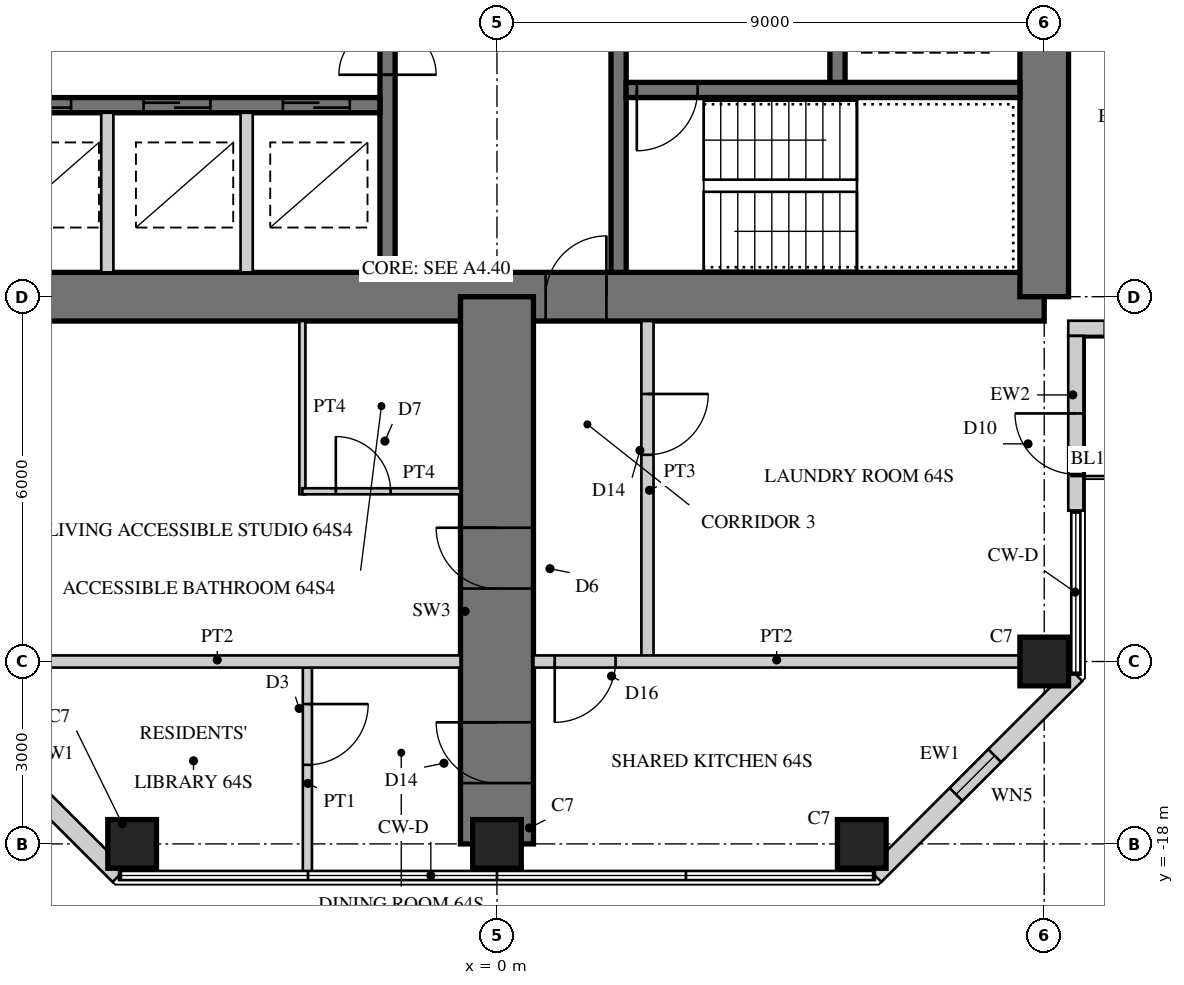
"""IFC4 building model, lengths in metres.
Left out: names, types, materials, properties, quantities, classifications, styles, units other than length and angle.
Written with IfcOpenShell. Run it as: python <this file> out.ifc"""

import sys

from ifc_helpers import new_model, si_unit, direction, frame, frame_2d, origin, origin_2d, place, context, subcontext, project, spatial, rectangle, hollow_rectangle, extrude, element, fill, save


model = new_model("IFC4")
c1 = context("Model", 3, precision=1e-05, world=origin(), true_north=direction((0.0, 1.0)))
c2 = subcontext(c1, "Body", "Model", "MODEL_VIEW")
j1 = project(units=[si_unit("LENGTHUNIT", "METRE"), si_unit("PLANEANGLEUNIT", "RADIAN")], contexts=[c1])
p1 = place(None, origin())
s1 = spatial("IfcSite", under=j1, at=p1, CompositionType="ELEMENT")
p2 = place(p1, origin())
s2 = spatial("IfcBuilding", under=s1, at=p2, CompositionType="ELEMENT")
p3 = place(p2, frame((0.0, 0.0, 249.3)))
s3 = spatial("IfcBuildingStorey", under=s2, at=p3, CompositionType="ELEMENT", Elevation=249.3)
p4 = place(p3, frame((-9.0, -9.0, 0.0), z_axis=(0.0, 0.0, 1.0), x_axis=(1.0, 0.0, 0.0)))
e1 = element("IfcWall", 1, at=p4, inside=s3, PredefinedType="SHEAR", context=c2, shape_type="SweptSolid", body=[
    extrude(rectangle(XDim=18.0, YDim=0.8, at=frame_2d((9.0, 0.0))), origin(), (0.0, 0.0, 1.0), 3.4),
])
p5 = place(p4, frame((9.8, 0.0, 0.0)))
e2 = element("IfcOpeningElement", 2, at=p5, cuts=e1, PredefinedType="OPENING", context=c2, shape_type="SweptSolid", body=[
    extrude(rectangle(XDim=1.0, YDim=2.4, at=frame_2d((0.5, 1.2))), frame((0.0, 0.41, 0.0), z_axis=(0.0, -1.0, 0.0), x_axis=(1.0, 0.0, 0.0)), (0.0, 0.0, 1.0), 0.82),
])
p6 = place(p3, frame((9.0, -9.0, 0.0), z_axis=(0.0, 0.0, 1.0), x_axis=(0.0, 1.0, 0.0)))
e3 = element("IfcWall", 3, at=p6, inside=s3, PredefinedType="SHEAR", context=c2, shape_type="SweptSolid", body=[
    extrude(rectangle(XDim=18.0, YDim=0.8, at=frame_2d((9.0, 0.0))), origin(), (0.0, 0.0, 1.0), 3.4),
])
p7 = place(p6, frame((9.8, 0.0, 0.0)))
e4 = element("IfcOpeningElement", 4, at=p7, cuts=e3, PredefinedType="OPENING", context=c2, shape_type="SweptSolid", body=[
    extrude(rectangle(XDim=1.0, YDim=2.4, at=frame_2d((0.5, 1.2))), frame((0.0, 0.41, 0.0), z_axis=(0.0, -1.0, 0.0), x_axis=(1.0, 0.0, 0.0)), (0.0, 0.0, 1.0), 0.82),
])
p8 = place(p3, frame((-1.8, -1.875, 0.0), z_axis=(0.0, 0.0, 1.0), x_axis=(0.0, -1.0, 0.0)))
e5 = element("IfcWall", 5, at=p8, inside=s3, PredefinedType="SHEAR", context=c2, shape_type="SweptSolid", body=[
    extrude(rectangle(XDim=6.725, YDim=0.25, at=frame_2d((3.363, 0.0))), origin(), (0.0, 0.0, 1.0), 3.4),
])
p9 = place(p8, frame((1.875, 0.0, 0.0)))
e6 = element("IfcOpeningElement", 6, at=p9, cuts=e5, PredefinedType="OPENING", context=c2, shape_type="SweptSolid", body=[
    extrude(rectangle(XDim=1.6, YDim=2.4, at=frame_2d((0.8, 1.2))), frame((0.0, 0.135, 0.0), z_axis=(0.0, -1.0, 0.0), x_axis=(1.0, 0.0, 0.0)), (0.0, 0.0, 1.0), 0.27),
])
p10 = place(p3, frame((-1.925, -5.85, 0.0), z_axis=(0.0, 0.0, 1.0), x_axis=(-1.0, 0.0, 0.0)))
e7 = element("IfcWall", 7, at=p10, inside=s3, PredefinedType="SHEAR", context=c2, shape_type="SweptSolid", body=[
    extrude(rectangle(XDim=6.675, YDim=0.25, at=frame_2d((3.337, 0.0))), origin(), (0.0, 0.0, 1.0), 3.4),
])
p11 = place(p10, frame((0.496, 0.0, 0.0)))
e8 = element("IfcOpeningElement", 8, at=p11, cuts=e7, PredefinedType="OPENING", context=c2, shape_type="SweptSolid", body=[
    extrude(rectangle(XDim=1.1, YDim=2.2, at=frame_2d((0.55, 1.1))), frame((0.0, 0.135, 0.0), z_axis=(0.0, -1.0, 0.0), x_axis=(1.0, 0.0, 0.0)), (0.0, 0.0, 1.0), 0.27),
])
p12 = place(p10, frame((2.788, 0.0, 0.0)))
e9 = element("IfcOpeningElement", 9, at=p12, cuts=e7, PredefinedType="OPENING", context=c2, shape_type="SweptSolid", body=[
    extrude(rectangle(XDim=1.1, YDim=2.2, at=frame_2d((0.55, 1.1))), frame((0.0, 0.135, 0.0), z_axis=(0.0, -1.0, 0.0), x_axis=(1.0, 0.0, 0.0)), (0.0, 0.0, 1.0), 0.27),
])
p13 = place(p10, frame((5.079, 0.0, 0.0)))
e10 = element("IfcOpeningElement", 10, at=p13, cuts=e7, PredefinedType="OPENING", context=c2, shape_type="SweptSolid", body=[
    extrude(rectangle(XDim=1.1, YDim=2.2, at=frame_2d((0.55, 1.1))), frame((0.0, 0.135, 0.0), z_axis=(0.0, -1.0, 0.0), x_axis=(1.0, 0.0, 0.0)), (0.0, 0.0, 1.0), 0.27),
])
for number, where, z_axis, x_axis in (
    (11, (-4.117, -5.975, 0.0), (0.0, 0.0, 1.0), (0.0, -1.0, 0.0)),
    (12, (-6.408, -5.975, 0.0), (0.0, 0.0, 1.0), (0.0, -1.0, 0.0)),
):
    element("IfcWall", number, at=place(p3, frame(where, z_axis=z_axis, x_axis=x_axis)), inside=s3, PredefinedType="PARTITIONING", context=c2, shape_type="SweptSolid", body=[
        extrude(rectangle(XDim=2.625, YDim=0.2, at=frame_2d((1.312, 0.0))), origin(), (0.0, 0.0, 1.0), 3.4),
    ])
p14 = place(p3, frame((2.0, -1.675, 0.0), z_axis=(0.0, 0.0, 1.0), x_axis=(0.0, -1.0, 0.0)))
e13 = element("IfcWall", 13, at=p14, inside=s3, PredefinedType="SHEAR", context=c2, shape_type="SweptSolid", body=[
    extrude(rectangle(XDim=6.925, YDim=0.25, at=frame_2d((3.462, 0.0))), origin(), (0.0, 0.0, 1.0), 3.4),
])
p15 = place(p14, frame((0.725, 0.0, 0.0)))
e14 = element("IfcOpeningElement", 14, at=p15, cuts=e13, PredefinedType="OPENING", context=c2, shape_type="SweptSolid", body=[
    extrude(rectangle(XDim=1.0, YDim=2.1, at=frame_2d((0.5, 1.05))), frame((0.0, 0.135, 0.0), z_axis=(0.0, -1.0, 0.0), x_axis=(1.0, 0.0, 0.0)), (0.0, 0.0, 1.0), 0.27),
])
p16 = place(p3, frame((2.125, -5.6, 0.0), z_axis=(0.0, 0.0, 1.0), x_axis=(1.0, 0.0, 0.0)))
e15 = element("IfcWall", 15, at=p16, inside=s3, PredefinedType="SHEAR", context=c2, shape_type="SweptSolid", body=[
    extrude(rectangle(XDim=6.475, YDim=0.25, at=frame_2d((3.238, 0.0))), origin(), (0.0, 0.0, 1.0), 3.4),
])
p17 = place(p16, frame((0.175, 0.0, 0.0)))
e16 = element("IfcOpeningElement", 16, at=p17, cuts=e15, PredefinedType="OPENING", context=c2, shape_type="SweptSolid", body=[
    extrude(rectangle(XDim=1.0, YDim=2.1, at=frame_2d((0.5, 1.05))), frame((0.0, 0.135, 0.0), z_axis=(0.0, -1.0, 0.0), x_axis=(1.0, 0.0, 0.0)), (0.0, 0.0, 1.0), 0.27),
])
p18 = place(p3, frame((5.6, -1.925, 0.0), z_axis=(0.0, 0.0, 1.0), x_axis=(0.0, -1.0, 0.0)))
e17 = element("IfcWall", 17, at=p18, inside=s3, PredefinedType="SHEAR", context=c2, shape_type="SweptSolid", body=[
    extrude(rectangle(XDim=3.55, YDim=0.25, at=frame_2d((1.775, 0.0))), origin(), (0.0, 0.0, 1.0), 3.4),
])
p19 = place(p18, frame((1.525, 0.0, 0.0)))
e18 = element("IfcOpeningElement", 18, at=p19, cuts=e17, PredefinedType="OPENING", context=c2, shape_type="SweptSolid", body=[
    extrude(rectangle(XDim=1.1, YDim=2.2, at=frame_2d((0.55, 1.1))), frame((0.0, 0.135, 0.0), z_axis=(0.0, -1.0, 0.0), x_axis=(1.0, 0.0, 0.0)), (0.0, 0.0, 1.0), 0.27),
])
p20 = place(p18, frame((0.075, 0.0, 0.0)))
e19 = element("IfcOpeningElement", 19, at=p20, cuts=e17, PredefinedType="OPENING", context=c2, shape_type="SweptSolid", body=[
    extrude(rectangle(XDim=0.8, YDim=2.1, at=frame_2d((0.4, 1.05))), frame((0.0, 0.135, 0.0), z_axis=(0.0, -1.0, 0.0), x_axis=(1.0, 0.0, 0.0)), (0.0, 0.0, 1.0), 0.27),
])
p21 = place(p3, frame((0.0, -9.0, 0.0), z_axis=(0.0, 0.0, 1.0), x_axis=(0.0, -1.0, 0.0)))
e20 = element("IfcWall", 20, at=p21, inside=s3, PredefinedType="SHEAR", context=c2, shape_type="SweptSolid", body=[
    extrude(rectangle(XDim=9.0, YDim=1.2, at=frame_2d((4.5, 0.0))), origin(), (0.0, 0.0, 1.0), 3.4),
])
p22 = place(p21, frame((3.8, 0.0, 0.0)))
e21 = element("IfcOpeningElement", 21, at=p22, cuts=e20, PredefinedType="OPENING", context=c2, shape_type="SweptSolid", body=[
    extrude(rectangle(XDim=1.0, YDim=2.15, at=frame_2d((0.5, 1.075))), frame((0.0, 0.61, 0.0), z_axis=(0.0, -1.0, 0.0), x_axis=(1.0, 0.0, 0.0)), (0.0, 0.0, 1.0), 1.22),
])
p23 = place(p21, frame((7.0, 0.0, 0.0)))
e22 = element("IfcOpeningElement", 22, at=p23, cuts=e20, PredefinedType="OPENING", context=c2, shape_type="SweptSolid", body=[
    extrude(rectangle(XDim=1.0, YDim=2.2, at=frame_2d((0.5, 1.1))), frame((0.0, 0.61, 0.0), z_axis=(0.0, -1.0, 0.0), x_axis=(1.0, 0.0, 0.0)), (0.0, 0.0, 1.0), 1.22),
])
for number, where, z_axis, x_axis in (
    (23, (9.0, -15.0, 0.0), (0.0, 0.0, 1.0), (1.0, 0.0, 0.0)),
    (24, (-6.0, -18.0, 0.0), (0.0, 0.0, 1.0), (1.0, 0.0, 0.0)),
    (25, (0.0, -18.0, 0.0), (0.0, 0.0, 1.0), (1.0, 0.0, 0.0)),
    (26, (6.0, -18.0, 0.0), (0.0, 0.0, 1.0), (1.0, 0.0, 0.0)),
):
    element("IfcColumn", number, at=place(p3, frame(where, z_axis=z_axis, x_axis=x_axis)), inside=s3, PredefinedType="COLUMN", context=c2, shape_type="SweptSolid", body=[
        extrude(rectangle(XDim=0.8, YDim=0.8, at=origin_2d()), origin(), (0.0, 0.0, 1.0), 3.4),
    ])
p24 = place(p3, frame((9.395, -9.52, 0.0), z_axis=(0.0, 0.0, 1.0), x_axis=(1.0, 0.0, 0.0)))
e27 = element("IfcWall", 27, at=p24, inside=s3, PredefinedType="SOLIDWALL", context=c2, shape_type="SweptSolid", body=[
    extrude(rectangle(XDim=3.125, YDim=0.25, at=frame_2d((1.562, 0.0))), origin(), (0.0, 0.0, 1.0), 3.15),
])
p25 = place(p24, frame((0.6, 0.0, 0.0)))
e28 = element("IfcOpeningElement", 28, at=p25, cuts=e27, PredefinedType="OPENING", context=c2, shape_type="SweptSolid", body=[
    extrude(rectangle(XDim=1.0, YDim=2.2, at=frame_2d((0.5, 1.1))), frame((0.0, 0.135, 0.0), z_axis=(0.0, -1.0, 0.0), x_axis=(1.0, 0.0, 0.0)), (0.0, 0.0, 1.0), 0.27),
])
p26 = place(p3, frame((-9.52, -15.215, 0.0), z_axis=(0.0, 0.0, 1.0), x_axis=(0.707106781187, -0.707106781187, 0.0)))
e29 = element("IfcWall", 29, at=p26, inside=s3, PredefinedType="SOLIDWALL", context=c2, shape_type="SweptSolid", body=[
    extrude(rectangle(XDim=4.674, YDim=0.3, at=frame_2d((2.337, 0.0))), origin(), (0.0, 0.0, 1.0), 3.15),
])
p27 = place(p26, frame((1.887, 0.0, 0.3)))
e30 = element("IfcOpeningElement", 30, at=p27, cuts=e29, PredefinedType="OPENING", context=c2, shape_type="SweptSolid", body=[
    extrude(rectangle(XDim=0.9, YDim=2.4, at=frame_2d((0.45, 1.2))), frame((0.0, 0.16, 0.0), z_axis=(0.0, -1.0, 0.0), x_axis=(1.0, 0.0, 0.0)), (0.0, 0.0, 1.0), 0.32),
])
p28 = place(p3, frame((6.215, -18.52, 0.0), z_axis=(0.0, 0.0, 1.0), x_axis=(0.707106781187, 0.707106781187, 0.0)))
e31 = element("IfcWall", 31, at=p28, inside=s3, PredefinedType="SOLIDWALL", context=c2, shape_type="SweptSolid", body=[
    extrude(rectangle(XDim=4.674, YDim=0.3, at=frame_2d((2.337, 0.0))), origin(), (0.0, 0.0, 1.0), 3.15),
])
p29 = place(p28, frame((1.887, 0.0, 0.3)))
e32 = element("IfcOpeningElement", 32, at=p29, cuts=e31, PredefinedType="OPENING", context=c2, shape_type="SweptSolid", body=[
    extrude(rectangle(XDim=0.9, YDim=2.4, at=frame_2d((0.45, 1.2))), frame((0.0, 0.16, 0.0), z_axis=(0.0, -1.0, 0.0), x_axis=(1.0, 0.0, 0.0)), (0.0, 0.0, 1.0), 0.32),
])
p30 = place(p3, frame((9.52, -12.52, 0.0), z_axis=(0.0, 0.0, 1.0), x_axis=(0.0, 1.0, 0.0)))
e33 = element("IfcWall", 33, at=p30, inside=s3, PredefinedType="SOLIDWALL", context=c2, shape_type="SweptSolid", body=[
    extrude(rectangle(XDim=2.875, YDim=0.25, at=frame_2d((1.438, 0.0))), origin(), (0.0, 0.0, 1.0), 3.15),
])
p31 = place(p30, frame((0.6, 0.0, 0.0)))
e34 = element("IfcOpeningElement", 34, at=p31, cuts=e33, PredefinedType="OPENING", context=c2, shape_type="SweptSolid", body=[
    extrude(rectangle(XDim=1.0, YDim=2.2, at=frame_2d((0.5, 1.1))), frame((0.0, 0.135, 0.0), z_axis=(0.0, -1.0, 0.0), x_axis=(1.0, 0.0, 0.0)), (0.0, 0.0, 1.0), 0.27),
])
p32 = place(p3, frame((-3.2, -9.4, 0.0), z_axis=(0.0, 0.0, 1.0), x_axis=(0.0, -1.0, 0.0)))
e35 = element("IfcWall", 35, at=p32, inside=s3, PredefinedType="PARTITIONING", context=c2, shape_type="SweptSolid", body=[
    extrude(rectangle(XDim=2.85, YDim=0.1, at=frame_2d((1.425, 0.0))), origin(), (0.0, 0.0, 1.0), 3.15),
])
p33 = place(p3, frame((-3.2, -12.2, 0.0), z_axis=(0.0, 0.0, 1.0), x_axis=(1.0, 0.0, 0.0)))
e36 = element("IfcWall", 36, at=p33, inside=s3, PredefinedType="PARTITIONING", context=c2, shape_type="SweptSolid", body=[
    extrude(rectangle(XDim=2.6, YDim=0.1, at=frame_2d((1.3, 0.0))), origin(), (0.0, 0.0, 1.0), 3.15),
])
p34 = place(p33, frame((0.55, 0.0, 0.0)))
e37 = element("IfcOpeningElement", 37, at=p34, cuts=e36, PredefinedType="OPENING", context=c2, shape_type="SweptSolid", body=[
    extrude(rectangle(XDim=0.9, YDim=2.1, at=frame_2d((0.45, 1.05))), frame((0.0, 0.06, 0.0), z_axis=(0.0, -1.0, 0.0), x_axis=(1.0, 0.0, 0.0)), (0.0, 0.0, 1.0), 0.12),
])
p35 = place(p3, frame((2.475, -9.4, 0.0), z_axis=(0.0, 0.0, 1.0), x_axis=(0.0, -1.0, 0.0)))
e38 = element("IfcWall", 38, at=p35, inside=s3, PredefinedType="SOLIDWALL", context=c2, shape_type="SweptSolid", body=[
    extrude(rectangle(XDim=5.6, YDim=0.2, at=frame_2d((2.8, 0.0))), origin(), (0.0, 0.0, 1.0), 3.15),
])
p36 = place(p35, frame((1.2, 0.0, 0.0)))
e39 = element("IfcOpeningElement", 39, at=p36, cuts=e38, PredefinedType="OPENING", context=c2, shape_type="SweptSolid", body=[
    extrude(rectangle(XDim=1.0, YDim=2.2, at=frame_2d((0.5, 1.1))), frame((0.0, 0.11, 0.0), z_axis=(0.0, -1.0, 0.0), x_axis=(1.0, 0.0, 0.0)), (0.0, 0.0, 1.0), 0.22),
])
p37 = place(p3, frame((-3.118, -15.1, 0.0), z_axis=(0.0, 0.0, 1.0), x_axis=(0.0, -1.0, 0.0)))
e40 = element("IfcWall", 40, at=p37, inside=s3, PredefinedType="PARTITIONING", context=c2, shape_type="SweptSolid", body=[
    extrude(rectangle(XDim=3.38, YDim=0.15, at=frame_2d((1.69, 0.0))), origin(), (0.0, 0.0, 1.0), 3.15),
])
p38 = place(p37, frame((0.6, 0.0, 0.0)))
e41 = element("IfcOpeningElement", 41, at=p38, cuts=e40, PredefinedType="OPENING", context=c2, shape_type="SweptSolid", body=[
    extrude(rectangle(XDim=1.0, YDim=2.1, at=frame_2d((0.5, 1.05))), frame((0.0, 0.085, 0.0), z_axis=(0.0, -1.0, 0.0), x_axis=(1.0, 0.0, 0.0)), (0.0, 0.0, 1.0), 0.17),
])
p39 = place(p3, frame((-8.6, -15.0, 0.0), z_axis=(0.0, 0.0, 1.0), x_axis=(1.0, 0.0, 0.0)))
e42 = element("IfcWall", 42, at=p39, inside=s3, PredefinedType="SOLIDWALL", context=c2, shape_type="SweptSolid", body=[
    extrude(rectangle(XDim=8.0, YDim=0.2, at=frame_2d((4.0, 0.0))), origin(), (0.0, 0.0, 1.0), 2.1),
])
p40 = place(p3, frame((0.6, -15.0, 0.0), z_axis=(0.0, 0.0, 1.0), x_axis=(1.0, 0.0, 0.0)))
e43 = element("IfcWall", 43, at=p40, inside=s3, PredefinedType="SOLIDWALL", context=c2, shape_type="SweptSolid", body=[
    extrude(rectangle(XDim=8.0, YDim=0.2, at=frame_2d((4.0, 0.0))), origin(), (0.0, 0.0, 1.0), 2.1),
])
p41 = place(p40, frame((0.35, 0.0, 0.0)))
e44 = element("IfcOpeningElement", 44, at=p41, cuts=e43, PredefinedType="OPENING", context=c2, shape_type="SweptSolid", body=[
    extrude(rectangle(XDim=1.0, YDim=2.0, at=frame_2d((0.5, 1.0))), frame((0.0, 0.11, 0.0), z_axis=(0.0, -1.0, 0.0), x_axis=(1.0, 0.0, 0.0)), (0.0, 0.0, 1.0), 0.22),
])
p42 = place(p25, origin())
e45 = element("IfcDoor", 45, at=p42, inside=s3, OperationType="SINGLE_SWING_RIGHT", PredefinedType="DOOR", context=c2, shape_type="SweptSolid", body=[
    extrude(hollow_rectangle(XDim=1.0, YDim=2.2, WallThickness=0.06, at=frame_2d((0.5, 1.1))), frame((0.0, 0.025, 0.0), z_axis=(0.0, -1.0, 0.0), x_axis=(1.0, 0.0, 0.0)), (0.0, 0.0, 1.0), 0.05),
    extrude(rectangle(XDim=0.879, YDim=2.079, at=frame_2d((0.5, 1.1))), frame((0.0, 0.025, 0.0), z_axis=(0.0, -1.0, 0.0), x_axis=(1.0, 0.0, 0.0)), (0.0, 0.0, 1.0), 0.05),
])
fill(e28, e45)
p43 = place(p29, origin())
e46 = element("IfcWindow", 46, at=p43, inside=s3, PartitioningType="SINGLE_PANEL", PredefinedType="WINDOW", context=c2, shape_type="SweptSolid", body=[
    extrude(hollow_rectangle(XDim=0.9, YDim=2.4, WallThickness=0.06, at=frame_2d((0.45, 1.2))), frame((0.0, 0.03, 0.0), z_axis=(0.0, -1.0, 0.0), x_axis=(1.0, 0.0, 0.0)), (0.0, 0.0, 1.0), 0.06),
    extrude(rectangle(XDim=0.779, YDim=2.279, at=frame_2d((0.45, 1.2))), frame((0.0, 0.03, 0.0), z_axis=(0.0, -1.0, 0.0), x_axis=(1.0, 0.0, 0.0)), (0.0, 0.0, 1.0), 0.06),
])
fill(e32, e46)
p44 = place(p31, origin())
e47 = element("IfcDoor", 47, at=p44, inside=s3, OperationType="SINGLE_SWING_RIGHT", PredefinedType="DOOR", context=c2, shape_type="SweptSolid", body=[
    extrude(hollow_rectangle(XDim=1.0, YDim=2.2, WallThickness=0.06, at=frame_2d((0.5, 1.1))), frame((0.0, 0.025, 0.0), z_axis=(0.0, -1.0, 0.0), x_axis=(1.0, 0.0, 0.0)), (0.0, 0.0, 1.0), 0.05),
    extrude(rectangle(XDim=0.879, YDim=2.079, at=frame_2d((0.5, 1.1))), frame((0.0, 0.025, 0.0), z_axis=(0.0, -1.0, 0.0), x_axis=(1.0, 0.0, 0.0)), (0.0, 0.0, 1.0), 0.05),
])
fill(e34, e47)
p45 = place(p34, origin())
e48 = element("IfcDoor", 48, at=p45, inside=s3, OperationType="SINGLE_SWING_LEFT", PredefinedType="DOOR", context=c2, shape_type="SweptSolid", body=[
    extrude(rectangle(XDim=0.9, YDim=2.1, at=frame_2d((0.45, 1.05))), frame((0.0, 0.025, 0.0), z_axis=(0.0, -1.0, 0.0), x_axis=(1.0, 0.0, 0.0)), (0.0, 0.0, 1.0), 0.05),
])
fill(e37, e48)
p46 = place(p36, origin())
e49 = element("IfcDoor", 49, at=p46, inside=s3, OperationType="SINGLE_SWING_LEFT", PredefinedType="DOOR", context=c2, shape_type="SweptSolid", body=[
    extrude(rectangle(XDim=1.0, YDim=2.2, at=frame_2d((0.5, 1.1))), frame((0.0, 0.025, 0.0), z_axis=(0.0, -1.0, 0.0), x_axis=(1.0, 0.0, 0.0)), (0.0, 0.0, 1.0), 0.05),
])
fill(e39, e49)
p47 = place(p38, origin())
e50 = element("IfcDoor", 50, at=p47, inside=s3, OperationType="SINGLE_SWING_LEFT", PredefinedType="DOOR", context=c2, shape_type="SweptSolid", body=[
    extrude(rectangle(XDim=1.0, YDim=2.1, at=frame_2d((0.5, 1.05))), frame((0.0, 0.025, 0.0), z_axis=(0.0, -1.0, 0.0), x_axis=(1.0, 0.0, 0.0)), (0.0, 0.0, 1.0), 0.05),
])
fill(e41, e50)
p48 = place(p41, frame((1.0, 0.0, 0.0), z_axis=(0.0, 0.0, 1.0), x_axis=(-1.0, 0.0, 0.0)))
e51 = element("IfcDoor", 51, at=p48, inside=s3, OperationType="SINGLE_SWING_RIGHT", PredefinedType="DOOR", context=c2, shape_type="SweptSolid", body=[
    extrude(rectangle(XDim=1.0, YDim=2.0, at=frame_2d((0.5, 1.0))), frame((0.0, 0.025, 0.0), z_axis=(0.0, -1.0, 0.0), x_axis=(1.0, 0.0, 0.0)), (0.0, 0.0, 1.0), 0.05),
])
fill(e44, e51)
p49 = place(p22, frame((1.0, 0.0, 0.0), z_axis=(0.0, 0.0, 1.0), x_axis=(-1.0, 0.0, 0.0)))
e52 = element("IfcDoor", 52, at=p49, inside=s3, OperationType="SINGLE_SWING_RIGHT", PredefinedType="DOOR", context=c2, shape_type="SweptSolid", body=[
    extrude(rectangle(XDim=1.0, YDim=2.15, at=frame_2d((0.5, 1.075))), frame((0.0, 0.025, 0.0), z_axis=(0.0, -1.0, 0.0), x_axis=(1.0, 0.0, 0.0)), (0.0, 0.0, 1.0), 0.05),
])
fill(e21, e52)
p50 = place(p23, frame((1.0, 0.0, 0.0), z_axis=(0.0, 0.0, 1.0), x_axis=(-1.0, 0.0, 0.0)))
e53 = element("IfcDoor", 53, at=p50, inside=s3, OperationType="SINGLE_SWING_RIGHT", PredefinedType="DOOR", context=c2, shape_type="SweptSolid", body=[
    extrude(rectangle(XDim=1.0, YDim=2.2, at=frame_2d((0.5, 1.1))), frame((0.0, 0.025, 0.0), z_axis=(0.0, -1.0, 0.0), x_axis=(1.0, 0.0, 0.0)), (0.0, 0.0, 1.0), 0.05),
])
fill(e22, e53)
p51 = place(p5, origin())
e54 = element("IfcDoor", 54, at=p51, inside=s3, OperationType="SINGLE_SWING_RIGHT", PredefinedType="DOOR", context=c2, shape_type="SweptSolid", body=[
    extrude(rectangle(XDim=1.0, YDim=2.4, at=frame_2d((0.5, 1.2))), frame((0.0, 0.055, 0.0), z_axis=(0.0, -1.0, 0.0), x_axis=(1.0, 0.0, 0.0)), (0.0, 0.0, 1.0), 0.05),
])
fill(e2, e54)
p52 = place(p11, origin())
e55 = element("IfcDoor", 55, at=p52, inside=s3, OperationType="DOUBLE_DOOR_SLIDING", PredefinedType="DOOR", context=c2, shape_type="SweptSolid", body=[
    extrude(rectangle(XDim=1.1, YDim=2.2, at=frame_2d((0.55, 1.1))), frame((0.0, 0.025, 0.0), z_axis=(0.0, -1.0, 0.0), x_axis=(1.0, 0.0, 0.0)), (0.0, 0.0, 1.0), 0.05),
])
fill(e8, e55)
p53 = place(p12, origin())
e56 = element("IfcDoor", 56, at=p53, inside=s3, OperationType="DOUBLE_DOOR_SLIDING", PredefinedType="DOOR", context=c2, shape_type="SweptSolid", body=[
    extrude(rectangle(XDim=1.1, YDim=2.2, at=frame_2d((0.55, 1.1))), frame((0.0, 0.025, 0.0), z_axis=(0.0, -1.0, 0.0), x_axis=(1.0, 0.0, 0.0)), (0.0, 0.0, 1.0), 0.05),
])
fill(e9, e56)
p54 = place(p13, origin())
e57 = element("IfcDoor", 57, at=p54, inside=s3, OperationType="DOUBLE_DOOR_SLIDING", PredefinedType="DOOR", context=c2, shape_type="SweptSolid", body=[
    extrude(rectangle(XDim=1.1, YDim=2.2, at=frame_2d((0.55, 1.1))), frame((0.0, 0.025, 0.0), z_axis=(0.0, -1.0, 0.0), x_axis=(1.0, 0.0, 0.0)), (0.0, 0.0, 1.0), 0.05),
])
fill(e10, e57)
p55 = place(p9, origin())
e58 = element("IfcDoor", 58, at=p55, inside=s3, OperationType="DOUBLE_DOOR_DOUBLE_SWING", PredefinedType="DOOR", context=c2, shape_type="SweptSolid", body=[
    extrude(rectangle(XDim=1.6, YDim=2.4, at=frame_2d((0.8, 1.2))), frame((0.0, 0.025, 0.0), z_axis=(0.0, -1.0, 0.0), x_axis=(1.0, 0.0, 0.0)), (0.0, 0.0, 1.0), 0.05),
])
fill(e6, e58)
p56 = place(p17, frame((1.0, 0.0, 0.0), z_axis=(0.0, 0.0, 1.0), x_axis=(-1.0, 0.0, 0.0)))
e59 = element("IfcDoor", 59, at=p56, inside=s3, OperationType="SINGLE_SWING_RIGHT", PredefinedType="DOOR", context=c2, shape_type="SweptSolid", body=[
    extrude(rectangle(XDim=1.0, YDim=2.1, at=frame_2d((0.5, 1.05))), frame((0.0, 0.025, 0.0), z_axis=(0.0, -1.0, 0.0), x_axis=(1.0, 0.0, 0.0)), (0.0, 0.0, 1.0), 0.05),
])
fill(e16, e59)
save(model, sys.argv[1])
